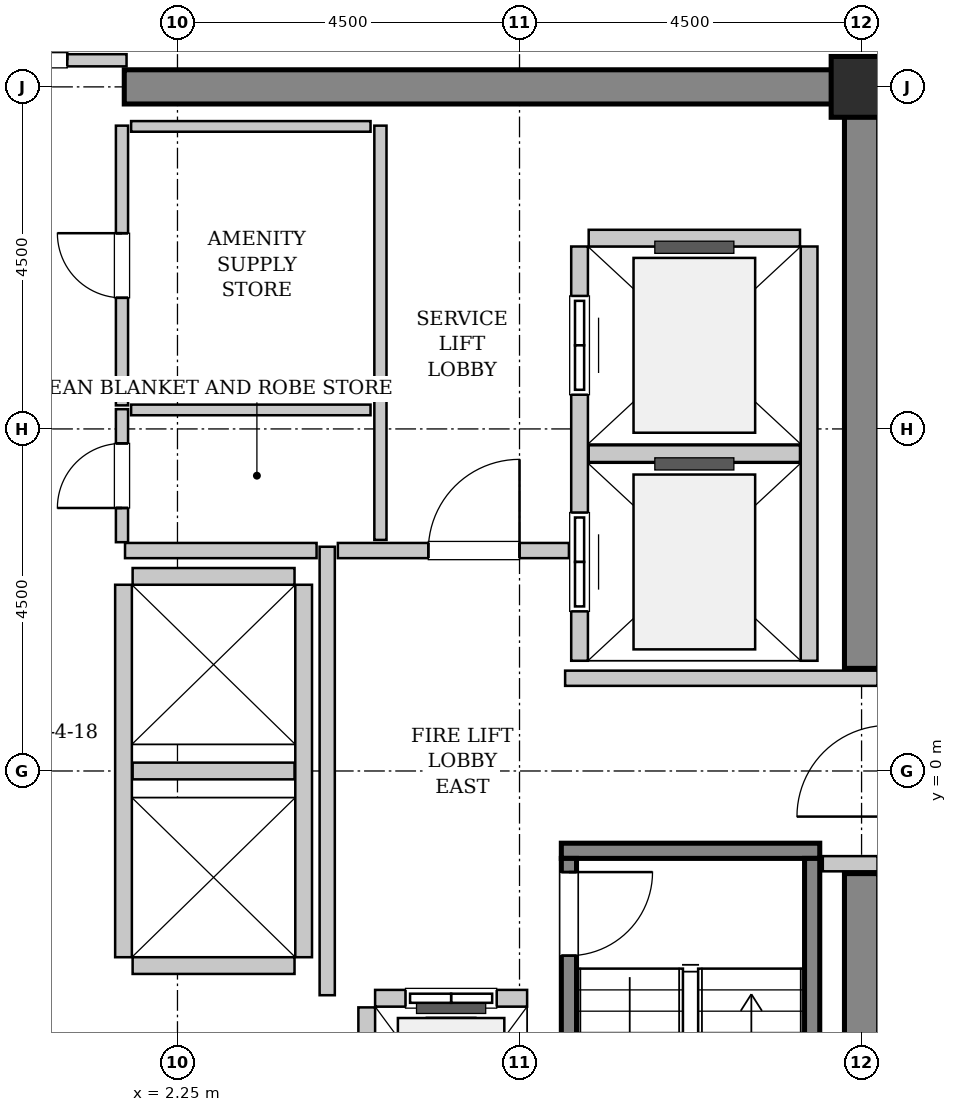
"""IFC4 building model, lengths in metres.
Left out: names, types, materials, properties, quantities, classifications, styles, units other than length and angle.
Written with IfcOpenShell. Run it as: python <this file> out.ifc"""

import sys

from ifc_helpers import new_model, si_unit, direction, frame, frame_2d, origin, origin_2d, place, context, subcontext, project, spatial, rectangle, hollow_rectangle, extrude, source, transform, mapped, element, fill, save


model = new_model("IFC4")
c1 = context("Model", 3, precision=1e-05, world=origin(), true_north=direction((0.0, 1.0)))
c2 = subcontext(c1, "Body", "Model", "MODEL_VIEW")
j1 = project(units=[si_unit("LENGTHUNIT", "METRE"), si_unit("PLANEANGLEUNIT", "RADIAN")], contexts=[c1])
p1 = place(None, origin())
s1 = spatial("IfcSite", under=j1, at=p1, CompositionType="ELEMENT")
p2 = place(p1, origin())
s2 = spatial("IfcBuilding", under=s1, at=p2, CompositionType="ELEMENT")
p3 = place(p2, frame((0.0, 0.0, 233.2)))
s3 = spatial("IfcBuildingStorey", under=s2, at=p3, CompositionType="ELEMENT", Elevation=233.2)
m1 = source(origin(), c2, "Body", "SweptSolid", [
    extrude(rectangle(XDim=9.925, YDim=0.45, at=frame_2d((4.962, 0.0))), origin(), (0.0, 0.0, 1.0), 3.8),
])
p4 = place(p3, frame((1.55, 9.0, 0.0), z_axis=(0.0, 0.0, 1.0), x_axis=(1.0, 0.0, 0.0)))
e1 = element("IfcWall", 1, at=p4, inside=s3, PredefinedType="SHEAR", context=c2, shape_type="MappedRepresentation", body=[
    mapped(m1, transform((0.0, 0.0, 0.0), x_axis=(1.0, 0.0, 0.0), y_axis=(0.0, 1.0, 0.0), z_axis=(0.0, 0.0, 1.0), scale=1.0)),
])
m2 = source(origin(), c2, "Body", "SweptSolid", [
    extrude(rectangle(XDim=7.425, YDim=0.45, at=frame_2d((3.712, 0.0))), origin(), (0.0, 0.0, 1.0), 3.8),
])
for number, where, z_axis, x_axis in (
    (2, (11.25, -8.775, 0.0), (0.0, 0.0, 1.0), (0.0, 1.0, 0.0)),
    (3, (11.25, 1.35, 0.0), (0.0, 0.0, 1.0), (0.0, 1.0, 0.0)),
):
    element("IfcWall", number, at=place(p3, frame(where, z_axis=z_axis, x_axis=x_axis)), inside=s3, PredefinedType="SHEAR", context=c2, shape_type="MappedRepresentation", body=[
        mapped(m2, transform((0.0, 0.0, 0.0), x_axis=(1.0, 0.0, 0.0), y_axis=(0.0, 1.0, 0.0), z_axis=(0.0, 0.0, 1.0), scale=1.0)),
    ])
m3 = source(origin(), c2, "Body", "SweptSolid", [
    extrude(hollow_rectangle(XDim=0.8, YDim=0.8, WallThickness=0.04, InnerFilletRadius=0.04, OuterFilletRadius=0.08, at=origin_2d()), origin(), (0.0, 0.0, 1.0), 3.8),
])
p5 = place(p3, frame((11.25, 9.0, 0.0), z_axis=(0.0, 0.0, 1.0), x_axis=(1.0, 0.0, 0.0)))
e4 = element("IfcColumn", 4, at=p5, inside=s3, PredefinedType="COLUMN", context=c2, shape_type="MappedRepresentation", body=[
    mapped(m3, transform((0.0, 0.0, 0.0), x_axis=(1.0, 0.0, 0.0), y_axis=(0.0, 1.0, 0.0), z_axis=(0.0, 0.0, 1.0), scale=1.0)),
])
m4 = source(origin(), c2, "Body", "SweptSolid", [
    extrude(rectangle(XDim=3.4, YDim=0.2, at=frame_2d((1.7, 0.0))), origin(), (0.0, 0.0, 1.0), 3.8),
])
p6 = place(p3, frame((7.3, -1.05, 0.0), z_axis=(0.0, 0.0, 1.0), x_axis=(1.0, 0.0, 0.0)))
e5 = element("IfcWall", 5, at=p6, inside=s3, PredefinedType="SOLIDWALL", context=c2, shape_type="MappedRepresentation", body=[
    mapped(m4, transform((0.0, 0.0, 0.0), x_axis=(1.0, 0.0, 0.0), y_axis=(0.0, 1.0, 0.0), z_axis=(0.0, 0.0, 1.0), scale=1.0)),
])
m5 = source(origin(), c2, "Body", "SweptSolid", [
    extrude(rectangle(XDim=7.1, YDim=0.2, at=frame_2d((3.55, 0.0))), origin(), (0.0, 0.0, 1.0), 3.8),
])
p7 = place(p3, frame((7.4, -1.15, 0.0), z_axis=(0.0, 0.0, 1.0), x_axis=(0.0, -1.0, 0.0)))
e6 = element("IfcWall", 6, at=p7, inside=s3, PredefinedType="SOLIDWALL", context=c2, shape_type="MappedRepresentation", body=[
    mapped(m5, transform((0.0, 0.0, 0.0), x_axis=(1.0, 0.0, 0.0), y_axis=(0.0, 1.0, 0.0), z_axis=(0.0, 0.0, 1.0), scale=1.0)),
])
p8 = place(p7, frame((0.18, 0.0, 0.0)))
e7 = element("IfcOpeningElement", 7, at=p8, cuts=e6, PredefinedType="OPENING", context=c2, shape_type="SweptSolid", body=[
    extrude(rectangle(XDim=1.1, YDim=2.15, at=frame_2d((0.55, 1.075))), frame((0.0, 0.11, 0.0), z_axis=(0.0, -1.0, 0.0), x_axis=(1.0, 0.0, 0.0)), (0.0, 0.0, 1.0), 0.22),
])
p9 = place(p3, frame((10.6, -1.15, 0.0), z_axis=(0.0, 0.0, 1.0), x_axis=(0.0, -1.0, 0.0)))
e8 = element("IfcWall", 8, at=p9, inside=s3, PredefinedType="SOLIDWALL", context=c2, shape_type="MappedRepresentation", body=[
    mapped(m5, transform((0.0, 0.0, 0.0), x_axis=(1.0, 0.0, 0.0), y_axis=(0.0, 1.0, 0.0), z_axis=(0.0, 0.0, 1.0), scale=1.0)),
])
m6 = source(origin(), c2, "Body", "SweptSolid", [
    extrude(rectangle(XDim=2.0, YDim=0.22, at=frame_2d((1.0, 0.0))), origin(), (0.0, 0.0, 1.0), 3.535),
])
p10 = place(p3, frame((6.85, -2.99, 0.0), z_axis=(0.0, 0.0, 1.0), x_axis=(-1.0, 0.0, 0.0)))
e9 = element("IfcWall", 9, at=p10, inside=s3, PredefinedType="SOLIDWALL", context=c2, shape_type="MappedRepresentation", body=[
    mapped(m6, transform((0.0, 0.0, 0.0), x_axis=(1.0, 0.0, 0.0), y_axis=(0.0, 1.0, 0.0), z_axis=(0.0, 0.0, 1.0), scale=1.0)),
])
p11 = place(p10, frame((0.4, 0.0, 0.0)))
e10 = element("IfcOpeningElement", 10, at=p11, cuts=e9, PredefinedType="OPENING", context=c2, shape_type="SweptSolid", body=[
    extrude(rectangle(XDim=1.2, YDim=2.2, at=frame_2d((0.6, 1.1))), frame((0.0, 0.12, 0.0), z_axis=(0.0, -1.0, 0.0), x_axis=(1.0, 0.0, 0.0)), (0.0, 0.0, 1.0), 0.24),
])
m7 = source(origin(), c2, "Body", "SweptSolid", [
    extrude(rectangle(XDim=2.68, YDim=0.22, at=frame_2d((1.34, 0.0))), origin(), (0.0, 0.0, 1.0), 3.535),
])
p12 = place(p3, frame((4.74, -3.11, 0.0), z_axis=(0.0, 0.0, 1.0), x_axis=(0.0, -1.0, 0.0)))
e11 = element("IfcWall", 11, at=p12, inside=s3, PredefinedType="SOLIDWALL", context=c2, shape_type="MappedRepresentation", body=[
    mapped(m7, transform((0.0, 0.0, 0.0), x_axis=(1.0, 0.0, 0.0), y_axis=(0.0, 1.0, 0.0), z_axis=(0.0, 0.0, 1.0), scale=1.0)),
])
m8 = source(origin(), c2, "Body", "SweptSolid", [
    extrude(rectangle(XDim=5.45, YDim=0.22, at=frame_2d((2.725, 0.0))), origin(), (0.0, 0.0, 1.0), 3.535),
])
p13 = place(p3, frame((7.54, 6.9, 0.0), z_axis=(0.0, 0.0, 1.0), x_axis=(0.0, -1.0, 0.0)))
e12 = element("IfcWall", 12, at=p13, inside=s3, PredefinedType="SOLIDWALL", context=c2, shape_type="MappedRepresentation", body=[
    mapped(m8, transform((0.0, 0.0, 0.0), x_axis=(1.0, 0.0, 0.0), y_axis=(0.0, 1.0, 0.0), z_axis=(0.0, 0.0, 1.0), scale=1.0)),
])
p14 = place(p13, frame((3.5, 0.0, 0.0)))
e13 = element("IfcOpeningElement", 13, at=p14, cuts=e12, PredefinedType="OPENING", context=c2, shape_type="SweptSolid", body=[
    extrude(rectangle(XDim=1.3, YDim=2.3, at=frame_2d((0.65, 1.15))), frame((0.0, 0.12, 0.0), z_axis=(0.0, -1.0, 0.0), x_axis=(1.0, 0.0, 0.0)), (0.0, 0.0, 1.0), 0.24),
])
p15 = place(p13, frame((0.65, 0.0, 0.0)))
e14 = element("IfcOpeningElement", 14, at=p15, cuts=e12, PredefinedType="OPENING", context=c2, shape_type="SweptSolid", body=[
    extrude(rectangle(XDim=1.3, YDim=2.3, at=frame_2d((0.65, 1.15))), frame((0.0, 0.12, 0.0), z_axis=(0.0, -1.0, 0.0), x_axis=(1.0, 0.0, 0.0)), (0.0, 0.0, 1.0), 0.24),
])
p16 = place(p3, frame((10.56, 1.45, 0.0), z_axis=(0.0, 0.0, 1.0), x_axis=(0.0, 1.0, 0.0)))
e15 = element("IfcWall", 15, at=p16, inside=s3, PredefinedType="SOLIDWALL", context=c2, shape_type="MappedRepresentation", body=[
    mapped(m8, transform((0.0, 0.0, 0.0), x_axis=(1.0, 0.0, 0.0), y_axis=(0.0, 1.0, 0.0), z_axis=(0.0, 0.0, 1.0), scale=1.0)),
])
m9 = source(origin(), c2, "Body", "SweptSolid", [
    extrude(rectangle(XDim=2.78, YDim=0.22, at=frame_2d((1.39, 0.0))), origin(), (0.0, 0.0, 1.0), 3.535),
])
for number, where, z_axis, x_axis in (
    (16, (7.66, 4.175, 0.0), (0.0, 0.0, 1.0), (1.0, 0.0, 0.0)),
    (17, (10.44, 7.01, 0.0), (0.0, 0.0, 1.0), (-1.0, 0.0, 0.0)),
):
    element("IfcWall", number, at=place(p3, frame(where, z_axis=z_axis, x_axis=x_axis)), inside=s3, PredefinedType="SOLIDWALL", context=c2, shape_type="MappedRepresentation", body=[
        mapped(m9, transform((0.0, 0.0, 0.0), x_axis=(1.0, 0.0, 0.0), y_axis=(0.0, 1.0, 0.0), z_axis=(0.0, 0.0, 1.0), scale=1.0)),
    ])
m10 = source(origin(), c2, "Body", "SweptSolid", [
    extrude(rectangle(XDim=4.9, YDim=0.22, at=frame_2d((2.45, 0.0))), origin(), (0.0, 0.0, 1.0), 3.535),
])
for number, where, z_axis, x_axis in (
    (18, (1.54, 2.45, 0.0), (0.0, 0.0, 1.0), (0.0, -1.0, 0.0)),
    (19, (3.91, -2.45, 0.0), (0.0, 0.0, 1.0), (0.0, 1.0, 0.0)),
):
    element("IfcWall", number, at=place(p3, frame(where, z_axis=z_axis, x_axis=x_axis)), inside=s3, PredefinedType="SOLIDWALL", context=c2, shape_type="MappedRepresentation", body=[
        mapped(m10, transform((0.0, 0.0, 0.0), x_axis=(1.0, 0.0, 0.0), y_axis=(0.0, 1.0, 0.0), z_axis=(0.0, 0.0, 1.0), scale=1.0)),
    ])
m11 = source(origin(), c2, "Body", "SweptSolid", [
    extrude(rectangle(XDim=2.13, YDim=0.22, at=frame_2d((1.065, 0.0))), origin(), (0.0, 0.0, 1.0), 3.535),
])
for number, where, z_axis, x_axis in (
    (20, (1.66, -2.56, 0.0), (0.0, 0.0, 1.0), (1.0, 0.0, 0.0)),
    (21, (1.66, 0.0, 0.0), (0.0, 0.0, 1.0), (1.0, 0.0, 0.0)),
    (22, (3.79, 2.56, 0.0), (0.0, 0.0, 1.0), (-1.0, 0.0, 0.0)),
):
    element("IfcWall", number, at=place(p3, frame(where, z_axis=z_axis, x_axis=x_axis)), inside=s3, PredefinedType="SOLIDWALL", context=c2, shape_type="MappedRepresentation", body=[
        mapped(m11, transform((0.0, 0.0, 0.0), x_axis=(1.0, 0.0, 0.0), y_axis=(0.0, 1.0, 0.0), z_axis=(0.0, 0.0, 1.0), scale=1.0)),
    ])
m12 = source(origin(), c2, "Body", "SweptSolid", [
    extrude(rectangle(XDim=5.9, YDim=0.2, at=frame_2d((2.95, 0.0))), origin(), (0.0, 0.0, 1.0), 3.535),
])
p17 = place(p3, frame((4.22, -2.95, 0.0), z_axis=(0.0, 0.0, 1.0), x_axis=(0.0, 1.0, 0.0)))
e23 = element("IfcWall", 23, at=p17, inside=s3, PredefinedType="PARTITIONING", context=c2, shape_type="MappedRepresentation", body=[
    mapped(m12, transform((0.0, 0.0, 0.0), x_axis=(1.0, 0.0, 0.0), y_axis=(0.0, 1.0, 0.0), z_axis=(0.0, 0.0, 1.0), scale=1.0)),
])
m13 = source(origin(), c2, "Body", "SweptSolid", [
    extrude(rectangle(XDim=2.52, YDim=0.2, at=frame_2d((1.26, 0.0))), origin(), (0.0, 0.0, 1.0), 3.535),
])
p18 = place(p3, frame((1.56, 2.9, 0.0), z_axis=(0.0, 0.0, 1.0), x_axis=(1.0, 0.0, 0.0)))
e24 = element("IfcWall", 24, at=p18, inside=s3, PredefinedType="PARTITIONING", context=c2, shape_type="MappedRepresentation", body=[
    mapped(m13, transform((0.0, 0.0, 0.0), x_axis=(1.0, 0.0, 0.0), y_axis=(0.0, 1.0, 0.0), z_axis=(0.0, 0.0, 1.0), scale=1.0)),
])
m14 = source(origin(), c2, "Body", "SweptSolid", [
    extrude(rectangle(XDim=3.04, YDim=0.2, at=frame_2d((1.52, 0.0))), origin(), (0.0, 0.0, 1.0), 3.535),
])
p19 = place(p3, frame((4.36, 2.9, 0.0), z_axis=(0.0, 0.0, 1.0), x_axis=(1.0, 0.0, 0.0)))
e25 = element("IfcWall", 25, at=p19, inside=s3, PredefinedType="PARTITIONING", context=c2, shape_type="MappedRepresentation", body=[
    mapped(m14, transform((0.0, 0.0, 0.0), x_axis=(1.0, 0.0, 0.0), y_axis=(0.0, 1.0, 0.0), z_axis=(0.0, 0.0, 1.0), scale=1.0)),
])
p20 = place(p19, frame((1.19, 0.0, 0.0)))
e26 = element("IfcOpeningElement", 26, at=p20, cuts=e25, PredefinedType="OPENING", context=c2, shape_type="SweptSolid", body=[
    extrude(rectangle(XDim=1.2, YDim=2.15, at=frame_2d((0.6, 1.075))), frame((0.0, 0.11, 0.0), z_axis=(0.0, -1.0, 0.0), x_axis=(1.0, 0.0, 0.0)), (0.0, 0.0, 1.0), 0.22),
])
m15 = source(origin(), c2, "Body", "SweptSolid", [
    extrude(rectangle(XDim=4.11, YDim=0.2, at=frame_2d((2.055, 0.0))), origin(), (0.0, 0.0, 1.0), 3.535),
])
p21 = place(p3, frame((7.35, 1.22, 0.0), z_axis=(0.0, 0.0, 1.0), x_axis=(1.0, 0.0, 0.0)))
e27 = element("IfcWall", 27, at=p21, inside=s3, PredefinedType="PARTITIONING", context=c2, shape_type="MappedRepresentation", body=[
    mapped(m15, transform((0.0, 0.0, 0.0), x_axis=(1.0, 0.0, 0.0), y_axis=(0.0, 1.0, 0.0), z_axis=(0.0, 0.0, 1.0), scale=1.0)),
])
m16 = source(origin(), c2, "Body", "SweptSolid", [
    extrude(rectangle(XDim=0.72, YDim=0.2, at=frame_2d((0.36, 0.0))), origin(), (0.0, 0.0, 1.0), 3.535),
])
p22 = place(p3, frame((10.74, -1.22, 0.0), z_axis=(0.0, 0.0, 1.0), x_axis=(1.0, 0.0, 0.0)))
e28 = element("IfcWall", 28, at=p22, inside=s3, PredefinedType="PARTITIONING", context=c2, shape_type="MappedRepresentation", body=[
    mapped(m16, transform((0.0, 0.0, 0.0), x_axis=(1.0, 0.0, 0.0), y_axis=(0.0, 1.0, 0.0), z_axis=(0.0, 0.0, 1.0), scale=1.0)),
])
m17 = source(origin(), c2, "Body", "SweptSolid", [
    extrude(rectangle(XDim=3.16, YDim=0.16, at=frame_2d((1.58, 0.0))), origin(), (0.0, 0.0, 1.0), 2.625),
])
p23 = place(p3, frame((-1.58, 9.35, 0.0), z_axis=(0.0, 0.0, 1.0), x_axis=(1.0, 0.0, 0.0)))
e29 = element("IfcWall", 29, at=p23, inside=s3, PredefinedType="PARTITIONING", context=c2, shape_type="MappedRepresentation", body=[
    mapped(m17, transform((0.0, 0.0, 0.0), x_axis=(1.0, 0.0, 0.0), y_axis=(0.0, 1.0, 0.0), z_axis=(0.0, 0.0, 1.0), scale=1.0)),
])
p24 = place(p23, frame((0.78, 0.0, 0.0)))
e30 = element("IfcOpeningElement", 30, at=p24, cuts=e29, PredefinedType="OPENING", context=c2, shape_type="SweptSolid", body=[
    extrude(rectangle(XDim=1.6, YDim=2.3, at=frame_2d((0.8, 1.15))), frame((0.0, 0.09, 0.0), z_axis=(0.0, -1.0, 0.0), x_axis=(1.0, 0.0, 0.0)), (0.0, 0.0, 1.0), 0.18),
])
m18 = source(origin(), c2, "Body", "SweptSolid", [
    extrude(rectangle(XDim=5.45, YDim=0.16, at=frame_2d((2.725, 0.0))), origin(), (0.0, 0.0, 1.0), 3.535),
])
p25 = place(p3, frame((4.92, 3.04, 0.0), z_axis=(0.0, 0.0, 1.0), x_axis=(0.0, 1.0, 0.0)))
e31 = element("IfcWall", 31, at=p25, inside=s3, PredefinedType="PARTITIONING", context=c2, shape_type="MappedRepresentation", body=[
    mapped(m18, transform((0.0, 0.0, 0.0), x_axis=(1.0, 0.0, 0.0), y_axis=(0.0, 1.0, 0.0), z_axis=(0.0, 0.0, 1.0), scale=1.0)),
])
m19 = source(origin(), c2, "Body", "SweptSolid", [
    extrude(rectangle(XDim=1.75, YDim=0.16, at=frame_2d((0.875, 0.0))), origin(), (0.0, 0.0, 1.0), 3.535),
])
p26 = place(p3, frame((1.52, 3.01, 0.0), z_axis=(0.0, 0.0, 1.0), x_axis=(0.0, 1.0, 0.0)))
e32 = element("IfcWall", 32, at=p26, inside=s3, PredefinedType="PARTITIONING", context=c2, shape_type="MappedRepresentation", body=[
    mapped(m19, transform((0.0, 0.0, 0.0), x_axis=(1.0, 0.0, 0.0), y_axis=(0.0, 1.0, 0.0), z_axis=(0.0, 0.0, 1.0), scale=1.0)),
])
p27 = place(p26, frame((0.45, 0.0, 0.0)))
e33 = element("IfcOpeningElement", 33, at=p27, cuts=e32, PredefinedType="OPENING", context=c2, shape_type="SweptSolid", body=[
    extrude(rectangle(XDim=0.85, YDim=2.1, at=frame_2d((0.425, 1.05))), frame((0.0, 0.09, 0.0), z_axis=(0.0, -1.0, 0.0), x_axis=(1.0, 0.0, 0.0)), (0.0, 0.0, 1.0), 0.18),
])
m20 = source(origin(), c2, "Body", "SweptSolid", [
    extrude(rectangle(XDim=3.15, YDim=0.14, at=frame_2d((1.575, 0.0))), origin(), (0.0, 0.0, 1.0), 3.535),
])
p28 = place(p3, frame((1.64, 4.75, 0.0), z_axis=(0.0, 0.0, 1.0), x_axis=(1.0, 0.0, 0.0)))
e34 = element("IfcWall", 34, at=p28, inside=s3, PredefinedType="PARTITIONING", context=c2, shape_type="MappedRepresentation", body=[
    mapped(m20, transform((0.0, 0.0, 0.0), x_axis=(1.0, 0.0, 0.0), y_axis=(0.0, 1.0, 0.0), z_axis=(0.0, 0.0, 1.0), scale=1.0)),
])
m21 = source(origin(), c2, "Body", "SweptSolid", [
    extrude(rectangle(XDim=3.68, YDim=0.16, at=frame_2d((1.84, 0.0))), origin(), (0.0, 0.0, 1.0), 3.535),
])
p29 = place(p3, frame((1.52, 4.81, 0.0), z_axis=(0.0, 0.0, 1.0), x_axis=(0.0, 1.0, 0.0)))
e35 = element("IfcWall", 35, at=p29, inside=s3, PredefinedType="PARTITIONING", context=c2, shape_type="MappedRepresentation", body=[
    mapped(m21, transform((0.0, 0.0, 0.0), x_axis=(1.0, 0.0, 0.0), y_axis=(0.0, 1.0, 0.0), z_axis=(0.0, 0.0, 1.0), scale=1.0)),
])
p30 = place(p29, frame((1.415, 0.0, 0.0)))
e36 = element("IfcOpeningElement", 36, at=p30, cuts=e35, PredefinedType="OPENING", context=c2, shape_type="SweptSolid", body=[
    extrude(rectangle(XDim=0.85, YDim=2.1, at=frame_2d((0.425, 1.05))), frame((0.0, 0.09, 0.0), z_axis=(0.0, -1.0, 0.0), x_axis=(1.0, 0.0, 0.0)), (0.0, 0.0, 1.0), 0.18),
])
p31 = place(p3, frame((1.64, 8.48, 0.0), z_axis=(0.0, 0.0, 1.0), x_axis=(1.0, 0.0, 0.0)))
e37 = element("IfcWall", 37, at=p31, inside=s3, PredefinedType="PARTITIONING", context=c2, shape_type="MappedRepresentation", body=[
    mapped(m20, transform((0.0, 0.0, 0.0), x_axis=(1.0, 0.0, 0.0), y_axis=(0.0, 1.0, 0.0), z_axis=(0.0, 0.0, 1.0), scale=1.0)),
])
m22 = source(origin(), c2, "Body", "SweptSolid", [
    extrude(rectangle(XDim=1.1, YDim=2.15, at=frame_2d((0.55, 1.075))), frame((0.0, 0.025, 0.0), z_axis=(0.0, -1.0, 0.0), x_axis=(1.0, 0.0, 0.0)), (0.0, 0.0, 1.0), 0.05),
])
p32 = place(p8, origin())
e38 = element("IfcDoor", 38, at=p32, inside=s3, OperationType="SINGLE_SWING_LEFT", PredefinedType="DOOR", context=c2, shape_type="MappedRepresentation", body=[
    mapped(m22, transform((0.0, 0.0, 0.0), x_axis=(1.0, 0.0, 0.0), y_axis=(0.0, 1.0, 0.0), z_axis=(0.0, 0.0, 1.0), scale=1.0)),
])
fill(e7, e38)
m23 = source(origin(), c2, "Body", "SweptSolid", [
    extrude(rectangle(XDim=1.2, YDim=2.2, at=frame_2d((0.6, 1.1))), frame((0.0, 0.025, 0.0), z_axis=(0.0, -1.0, 0.0), x_axis=(1.0, 0.0, 0.0)), (0.0, 0.0, 1.0), 0.05),
])
p33 = place(p11, origin())
e39 = element("IfcDoor", 39, at=p33, inside=s3, OperationType="SLIDING_TO_LEFT", PredefinedType="DOOR", context=c2, shape_type="MappedRepresentation", body=[
    mapped(m23, transform((0.0, 0.0, 0.0), x_axis=(1.0, 0.0, 0.0), y_axis=(0.0, 1.0, 0.0), z_axis=(0.0, 0.0, 1.0), scale=1.0)),
])
fill(e10, e39)
m24 = source(origin(), c2, "Body", "SweptSolid", [
    extrude(rectangle(XDim=1.3, YDim=2.3, at=frame_2d((0.65, 1.15))), frame((0.0, 0.025, 0.0), z_axis=(0.0, -1.0, 0.0), x_axis=(1.0, 0.0, 0.0)), (0.0, 0.0, 1.0), 0.05),
])
p34 = place(p14, origin())
e40 = element("IfcDoor", 40, at=p34, inside=s3, OperationType="SLIDING_TO_RIGHT", PredefinedType="DOOR", context=c2, shape_type="MappedRepresentation", body=[
    mapped(m24, transform((0.0, 0.0, 0.0), x_axis=(1.0, 0.0, 0.0), y_axis=(0.0, 1.0, 0.0), z_axis=(0.0, 0.0, 1.0), scale=1.0)),
])
fill(e13, e40)
p35 = place(p15, origin())
e41 = element("IfcDoor", 41, at=p35, inside=s3, OperationType="SLIDING_TO_RIGHT", PredefinedType="DOOR", context=c2, shape_type="MappedRepresentation", body=[
    mapped(m24, transform((0.0, 0.0, 0.0), x_axis=(1.0, 0.0, 0.0), y_axis=(0.0, 1.0, 0.0), z_axis=(0.0, 0.0, 1.0), scale=1.0)),
])
fill(e14, e41)
m25 = source(origin(), c2, "Body", "SweptSolid", [
    extrude(rectangle(XDim=1.2, YDim=2.15, at=frame_2d((0.6, 1.075))), frame((0.0, 0.025, 0.0), z_axis=(0.0, -1.0, 0.0), x_axis=(1.0, 0.0, 0.0)), (0.0, 0.0, 1.0), 0.05),
])
p36 = place(p20, origin())
e42 = element("IfcDoor", 42, at=p36, inside=s3, OperationType="SINGLE_SWING_RIGHT", PredefinedType="DOOR", context=c2, shape_type="MappedRepresentation", body=[
    mapped(m25, transform((0.0, 0.0, 0.0), x_axis=(1.0, 0.0, 0.0), y_axis=(0.0, 1.0, 0.0), z_axis=(0.0, 0.0, 1.0), scale=1.0)),
])
fill(e26, e42)
m26 = source(origin(), c2, "Body", "SweptSolid", [
    extrude(rectangle(XDim=1.6, YDim=2.3, at=frame_2d((0.8, 1.15))), frame((0.0, 0.025, 0.0), z_axis=(0.0, -1.0, 0.0), x_axis=(1.0, 0.0, 0.0)), (0.0, 0.0, 1.0), 0.05),
])
p37 = place(p24, origin())
e43 = element("IfcDoor", 43, at=p37, inside=s3, OperationType="DOUBLE_DOOR_SINGLE_SWING", PredefinedType="DOOR", context=c2, shape_type="MappedRepresentation", body=[
    mapped(m26, transform((0.0, 0.0, 0.0), x_axis=(1.0, 0.0, 0.0), y_axis=(0.0, 1.0, 0.0), z_axis=(0.0, 0.0, 1.0), scale=1.0)),
])
fill(e30, e43)
m27 = source(origin(), c2, "Body", "SweptSolid", [
    extrude(rectangle(XDim=0.85, YDim=2.1, at=frame_2d((0.425, 1.05))), frame((0.0, 0.025, 0.0), z_axis=(0.0, -1.0, 0.0), x_axis=(1.0, 0.0, 0.0)), (0.0, 0.0, 1.0), 0.05),
])
p38 = place(p27, origin())
e44 = element("IfcDoor", 44, at=p38, inside=s3, OperationType="SINGLE_SWING_LEFT", PredefinedType="DOOR", context=c2, shape_type="MappedRepresentation", body=[
    mapped(m27, transform((0.0, 0.0, 0.0), x_axis=(1.0, 0.0, 0.0), y_axis=(0.0, 1.0, 0.0), z_axis=(0.0, 0.0, 1.0), scale=1.0)),
])
fill(e33, e44)
p39 = place(p30, origin())
e45 = element("IfcDoor", 45, at=p39, inside=s3, OperationType="SINGLE_SWING_RIGHT", PredefinedType="DOOR", context=c2, shape_type="MappedRepresentation", body=[
    mapped(m27, transform((0.0, 0.0, 0.0), x_axis=(1.0, 0.0, 0.0), y_axis=(0.0, 1.0, 0.0), z_axis=(0.0, 0.0, 1.0), scale=1.0)),
])
fill(e36, e45)
save(model, sys.argv[1])
